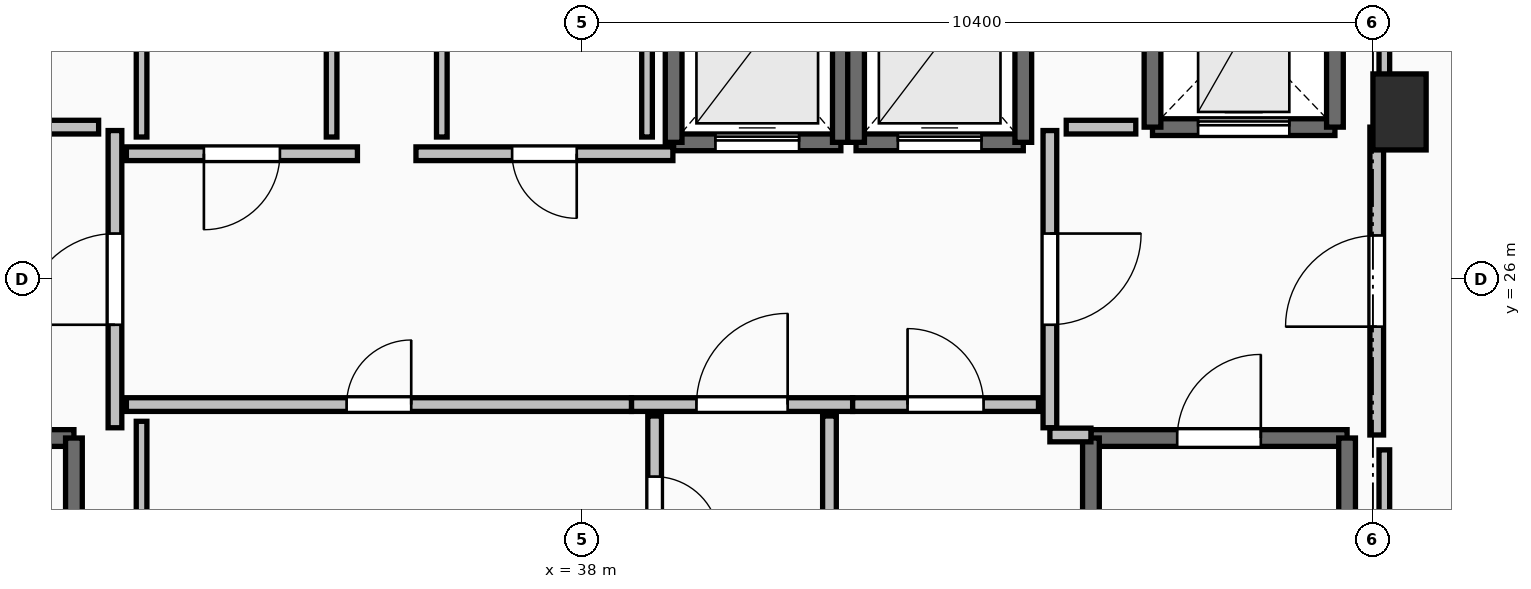
"""IFC4 building model, lengths in metres.
Left out: names, types, materials, properties, quantities, classifications, styles, units other than length and angle.
Written with IfcOpenShell. Run it as: python <this file> out.ifc"""

import sys

from ifc_helpers import new_model, si_unit, direction, frame, frame_2d, origin, origin_2d, place, context, subcontext, project, spatial, rectangle, extrude, element, fill, save


model = new_model("IFC4")
c1 = context("Model", 3, precision=1e-05, world=origin(), true_north=direction((0.0, 1.0)))
c2 = subcontext(c1, "Body", "Model", "MODEL_VIEW")
j1 = project(units=[si_unit("LENGTHUNIT", "METRE"), si_unit("PLANEANGLEUNIT", "RADIAN")], contexts=[c1])
p1 = place(None, origin())
s1 = spatial("IfcSite", under=j1, at=p1, CompositionType="ELEMENT")
p2 = place(p1, origin())
s2 = spatial("IfcBuilding", under=s1, at=p2, CompositionType="ELEMENT")
p3 = place(p2, frame((0.0, 0.0, 248.45)))
s3 = spatial("IfcBuildingStorey", under=s2, at=p3, CompositionType="ELEMENT", Elevation=248.45)
p4 = place(p3, frame((48.75, 28.2, 0.0), z_axis=(0.0, 0.0, 1.0), x_axis=(1.0, 0.0, 0.0)))
e1 = element("IfcColumn", 1, at=p4, inside=s3, PredefinedType="PILASTER", context=c2, shape_type="SweptSolid", body=[
    extrude(rectangle(XDim=0.7, YDim=1.0, at=origin_2d()), origin(), (0.0, 0.0, 1.0), 3.55),
])
p5 = place(p3, frame((27.94, 23.91, 0.0), z_axis=(0.0, 0.0, 1.0), x_axis=(1.0, 0.0, 0.0)))
e2 = element("IfcWall", 2, at=p5, inside=s3, PredefinedType="SOLIDWALL", context=c2, shape_type="SweptSolid", body=[
    extrude(rectangle(XDim=3.37, YDim=0.22, at=frame_2d((1.685, 0.0))), origin(), (0.0, 0.0, 1.0), 3.29),
])
p6 = place(p5, frame((1.135, 0.0, 0.0)))
e3 = element("IfcOpeningElement", 3, at=p6, cuts=e2, PredefinedType="OPENING", context=c2, shape_type="SweptSolid", body=[
    extrude(rectangle(XDim=1.1, YDim=2.15, at=frame_2d((0.55, 1.075))), frame((0.0, 0.125, 0.0), z_axis=(0.0, -1.0, 0.0), x_axis=(1.0, 0.0, 0.0)), (0.0, 0.0, 1.0), 0.25),
])
p7 = place(p3, frame((31.31, 23.91, 0.0), z_axis=(0.0, 0.0, 1.0), x_axis=(0.0, -1.0, 0.0)))
e4 = element("IfcWall", 4, at=p7, inside=s3, PredefinedType="SOLIDWALL", context=c2, shape_type="SweptSolid", body=[
    extrude(rectangle(XDim=7.42, YDim=0.22, at=frame_2d((3.71, 0.0))), origin(), (0.0, 0.0, 1.0), 3.29),
])
p8 = place(p3, frame((44.69, 23.91, 0.0), z_axis=(0.0, 0.0, 1.0), x_axis=(1.0, 0.0, 0.0)))
e5 = element("IfcWall", 5, at=p8, inside=s3, PredefinedType="SOLIDWALL", context=c2, shape_type="SweptSolid", body=[
    extrude(rectangle(XDim=3.37, YDim=0.22, at=frame_2d((1.685, 0.0))), origin(), (0.0, 0.0, 1.0), 3.29),
])
p9 = place(p8, frame((1.135, 0.0, 0.0)))
e6 = element("IfcOpeningElement", 6, at=p9, cuts=e5, PredefinedType="OPENING", context=c2, shape_type="SweptSolid", body=[
    extrude(rectangle(XDim=1.1, YDim=2.15, at=frame_2d((0.55, 1.075))), frame((0.0, 0.125, 0.0), z_axis=(0.0, -1.0, 0.0), x_axis=(1.0, 0.0, 0.0)), (0.0, 0.0, 1.0), 0.25),
])
for number, where, z_axis, x_axis in (
    (7, (48.06, 23.91, 0.0), (0.0, 0.0, 1.0), (0.0, -1.0, 0.0)),
    (8, (44.69, 16.49, 0.0), (0.0, 0.0, 1.0), (0.0, 1.0, 0.0)),
):
    element("IfcWall", number, at=place(p3, frame(where, z_axis=z_axis, x_axis=x_axis)), inside=s3, PredefinedType="SOLIDWALL", context=c2, shape_type="SweptSolid", body=[
        extrude(rectangle(XDim=7.42, YDim=0.22, at=frame_2d((3.71, 0.0))), origin(), (0.0, 0.0, 1.0), 3.29),
    ])
p10 = place(p3, frame((39.2, 27.8, 0.0), z_axis=(0.0, 0.0, 1.0), x_axis=(1.0, 0.0, 0.0)))
e9 = element("IfcWall", 9, at=p10, inside=s3, PredefinedType="SOLIDWALL", context=c2, shape_type="SweptSolid", body=[
    extrude(rectangle(XDim=2.2, YDim=0.22, at=frame_2d((1.1, 0.0))), origin(), (0.0, 0.0, 1.0), 3.29),
])
p11 = place(p10, frame((0.55, 0.0, 0.0)))
e10 = element("IfcOpeningElement", 10, at=p11, cuts=e9, PredefinedType="OPENING", context=c2, shape_type="SweptSolid", body=[
    extrude(rectangle(XDim=1.1, YDim=2.2, at=frame_2d((0.55, 1.1))), frame((0.0, 0.125, 0.0), z_axis=(0.0, -1.0, 0.0), x_axis=(1.0, 0.0, 0.0)), (0.0, 0.0, 1.0), 0.25),
])
for number, where, z_axis, x_axis in (
    (11, (41.4, 27.8, 0.0), (0.0, 0.0, 1.0), (0.0, 1.0, 0.0)),
    (12, (39.2, 30.4, 0.0), (0.0, 0.0, 1.0), (0.0, -1.0, 0.0)),
):
    element("IfcWall", number, at=place(p3, frame(where, z_axis=z_axis, x_axis=x_axis)), inside=s3, PredefinedType="SOLIDWALL", context=c2, shape_type="SweptSolid", body=[
        extrude(rectangle(XDim=2.6, YDim=0.22, at=frame_2d((1.3, 0.0))), origin(), (0.0, 0.0, 1.0), 3.29),
    ])
p12 = place(p3, frame((41.6, 27.8, 0.0), z_axis=(0.0, 0.0, 1.0), x_axis=(1.0, 0.0, 0.0)))
e13 = element("IfcWall", 13, at=p12, inside=s3, PredefinedType="SOLIDWALL", context=c2, shape_type="SweptSolid", body=[
    extrude(rectangle(XDim=2.2, YDim=0.22, at=frame_2d((1.1, 0.0))), origin(), (0.0, 0.0, 1.0), 3.29),
])
p13 = place(p12, frame((0.55, 0.0, 0.0)))
e14 = element("IfcOpeningElement", 14, at=p13, cuts=e13, PredefinedType="OPENING", context=c2, shape_type="SweptSolid", body=[
    extrude(rectangle(XDim=1.1, YDim=2.2, at=frame_2d((0.55, 1.1))), frame((0.0, 0.125, 0.0), z_axis=(0.0, -1.0, 0.0), x_axis=(1.0, 0.0, 0.0)), (0.0, 0.0, 1.0), 0.25),
])
for number, where, z_axis, x_axis in (
    (15, (43.8, 27.8, 0.0), (0.0, 0.0, 1.0), (0.0, 1.0, 0.0)),
    (16, (41.6, 30.4, 0.0), (0.0, 0.0, 1.0), (0.0, -1.0, 0.0)),
):
    element("IfcWall", number, at=place(p3, frame(where, z_axis=z_axis, x_axis=x_axis)), inside=s3, PredefinedType="SOLIDWALL", context=c2, shape_type="SweptSolid", body=[
        extrude(rectangle(XDim=2.6, YDim=0.22, at=frame_2d((1.3, 0.0))), origin(), (0.0, 0.0, 1.0), 3.29),
    ])
p14 = place(p3, frame((45.5, 28.0, 0.0), z_axis=(0.0, 0.0, 1.0), x_axis=(1.0, 0.0, 0.0)))
e17 = element("IfcWall", 17, at=p14, inside=s3, PredefinedType="SHEAR", context=c2, shape_type="SweptSolid", body=[
    extrude(rectangle(XDim=2.4, YDim=0.22, at=frame_2d((1.2, 0.0))), origin(), (0.0, 0.0, 1.0), 3.29),
])
p15 = place(p14, frame((0.6, 0.0, 0.0)))
e18 = element("IfcOpeningElement", 18, at=p15, cuts=e17, PredefinedType="OPENING", context=c2, shape_type="SweptSolid", body=[
    extrude(rectangle(XDim=1.2, YDim=2.2, at=frame_2d((0.6, 1.1))), frame((0.0, 0.125, 0.0), z_axis=(0.0, -1.0, 0.0), x_axis=(1.0, 0.0, 0.0)), (0.0, 0.0, 1.0), 0.25),
])
for number, where, z_axis, x_axis in (
    (19, (47.9, 28.0, 0.0), (0.0, 0.0, 1.0), (0.0, 1.0, 0.0)),
    (20, (45.5, 30.5, 0.0), (0.0, 0.0, 1.0), (0.0, -1.0, 0.0)),
):
    element("IfcWall", number, at=place(p3, frame(where, z_axis=z_axis, x_axis=x_axis)), inside=s3, PredefinedType="SHEAR", context=c2, shape_type="SweptSolid", body=[
        extrude(rectangle(XDim=2.5, YDim=0.22, at=frame_2d((1.25, 0.0))), origin(), (0.0, 0.0, 1.0), 3.29),
    ])
p16 = place(p3, frame((31.85, 24.045, 0.0), z_axis=(0.0, 0.0, 1.0), x_axis=(0.0, 1.0, 0.0)))
e21 = element("IfcWall", 21, at=p16, inside=s3, PredefinedType="PARTITIONING", context=c2, shape_type="SweptSolid", body=[
    extrude(rectangle(XDim=3.91, YDim=0.18, at=frame_2d((1.955, 0.0))), origin(), (0.0, 0.0, 1.0), 3.29),
])
p17 = place(p16, frame((1.355, 0.0, 0.0)))
e22 = element("IfcOpeningElement", 22, at=p17, cuts=e21, PredefinedType="OPENING", context=c2, shape_type="SweptSolid", body=[
    extrude(rectangle(XDim=1.2, YDim=2.15, at=frame_2d((0.6, 1.075))), frame((0.0, 0.105, 0.0), z_axis=(0.0, -1.0, 0.0), x_axis=(1.0, 0.0, 0.0)), (0.0, 0.0, 1.0), 0.21),
])
p18 = place(p3, frame((44.15, 27.955, 0.0), z_axis=(0.0, 0.0, 1.0), x_axis=(0.0, -1.0, 0.0)))
e23 = element("IfcWall", 23, at=p18, inside=s3, PredefinedType="PARTITIONING", context=c2, shape_type="SweptSolid", body=[
    extrude(rectangle(XDim=3.91, YDim=0.18, at=frame_2d((1.955, 0.0))), origin(), (0.0, 0.0, 1.0), 3.29),
])
p19 = place(p18, frame((1.355, 0.0, 0.0)))
e24 = element("IfcOpeningElement", 24, at=p19, cuts=e23, PredefinedType="OPENING", context=c2, shape_type="SweptSolid", body=[
    extrude(rectangle(XDim=1.2, YDim=2.15, at=frame_2d((0.6, 1.075))), frame((0.0, 0.105, 0.0), z_axis=(0.0, -1.0, 0.0), x_axis=(1.0, 0.0, 0.0)), (0.0, 0.0, 1.0), 0.21),
])
p20 = place(p3, frame((44.15, 23.95, 0.0), z_axis=(0.0, 0.0, 1.0), x_axis=(1.0, 0.0, 0.0)))
e25 = element("IfcWall", 25, at=p20, inside=s3, PredefinedType="PARTITIONING", context=c2, shape_type="SweptSolid", body=[
    extrude(rectangle(XDim=0.54, YDim=0.18, at=frame_2d((0.27, 0.0))), origin(), (0.0, 0.0, 1.0), 3.29),
])
p21 = place(p3, frame((48.45, 23.95, 0.0), z_axis=(0.0, 0.0, 1.0), x_axis=(0.0, 1.0, 0.0)))
e26 = element("IfcWall", 26, at=p21, inside=s3, PredefinedType="PARTITIONING", context=c2, shape_type="SweptSolid", body=[
    extrude(rectangle(XDim=4.05, YDim=0.18, at=frame_2d((2.025, 0.0))), origin(), (0.0, 0.0, 1.0), 3.29),
])
p22 = place(p21, frame((1.425, 0.0, 0.0)))
e27 = element("IfcOpeningElement", 27, at=p22, cuts=e26, PredefinedType="OPENING", context=c2, shape_type="SweptSolid", body=[
    extrude(rectangle(XDim=1.2, YDim=2.15, at=frame_2d((0.6, 1.075))), frame((0.0, 0.105, 0.0), z_axis=(0.0, -1.0, 0.0), x_axis=(1.0, 0.0, 0.0)), (0.0, 0.0, 1.0), 0.21),
])
p23 = place(p3, frame((38.645, 24.35, 0.0), z_axis=(0.0, 0.0, 1.0), x_axis=(1.0, 0.0, 0.0)))
e28 = element("IfcWall", 28, at=p23, inside=s3, PredefinedType="PARTITIONING", context=c2, shape_type="SweptSolid", body=[
    extrude(rectangle(XDim=2.91, YDim=0.18, at=frame_2d((1.455, 0.0))), origin(), (0.0, 0.0, 1.0), 3.29),
])
p24 = place(p23, frame((0.855, 0.0, 0.0)))
e29 = element("IfcOpeningElement", 29, at=p24, cuts=e28, PredefinedType="OPENING", context=c2, shape_type="SweptSolid", body=[
    extrude(rectangle(XDim=1.2, YDim=2.15, at=frame_2d((0.6, 1.075))), frame((0.0, 0.105, 0.0), z_axis=(0.0, -1.0, 0.0), x_axis=(1.0, 0.0, 0.0)), (0.0, 0.0, 1.0), 0.21),
])
p25 = place(p3, frame((41.555, 24.35, 0.0), z_axis=(0.0, 0.0, 1.0), x_axis=(1.0, 0.0, 0.0)))
e30 = element("IfcWall", 30, at=p25, inside=s3, PredefinedType="PARTITIONING", context=c2, shape_type="SweptSolid", body=[
    extrude(rectangle(XDim=2.445, YDim=0.18, at=frame_2d((1.223, 0.0))), origin(), (0.0, 0.0, 1.0), 3.29),
])
p26 = place(p25, frame((0.722, 0.0, 0.0)))
e31 = element("IfcOpeningElement", 31, at=p26, cuts=e30, PredefinedType="OPENING", context=c2, shape_type="SweptSolid", body=[
    extrude(rectangle(XDim=1.0, YDim=2.15, at=frame_2d((0.5, 1.075))), frame((0.0, 0.105, 0.0), z_axis=(0.0, -1.0, 0.0), x_axis=(1.0, 0.0, 0.0)), (0.0, 0.0, 1.0), 0.21),
])
p27 = place(p3, frame((35.04, 27.65, 0.0), z_axis=(0.0, 0.0, 1.0), x_axis=(-1.0, 0.0, 0.0)))
e32 = element("IfcWall", 32, at=p27, inside=s3, PredefinedType="PARTITIONING", context=c2, shape_type="SweptSolid", body=[
    extrude(rectangle(XDim=3.04, YDim=0.18, at=frame_2d((1.52, 0.0))), origin(), (0.0, 0.0, 1.0), 3.29),
])
p28 = place(p27, frame((1.02, 0.0, 0.0)))
e33 = element("IfcOpeningElement", 33, at=p28, cuts=e32, PredefinedType="OPENING", context=c2, shape_type="SweptSolid", body=[
    extrude(rectangle(XDim=1.0, YDim=2.15, at=frame_2d((0.5, 1.075))), frame((0.0, 0.105, 0.0), z_axis=(0.0, -1.0, 0.0), x_axis=(1.0, 0.0, 0.0)), (0.0, 0.0, 1.0), 0.21),
])
p29 = place(p3, frame((39.19, 27.65, 0.0), z_axis=(0.0, 0.0, 1.0), x_axis=(-1.0, 0.0, 0.0)))
e34 = element("IfcWall", 34, at=p29, inside=s3, PredefinedType="PARTITIONING", context=c2, shape_type="SweptSolid", body=[
    extrude(rectangle(XDim=3.38, YDim=0.18, at=frame_2d((1.69, 0.0))), origin(), (0.0, 0.0, 1.0), 3.29),
])
p30 = place(p29, frame((1.265, 0.0, 0.0)))
e35 = element("IfcOpeningElement", 35, at=p30, cuts=e34, PredefinedType="OPENING", context=c2, shape_type="SweptSolid", body=[
    extrude(rectangle(XDim=0.85, YDim=2.1, at=frame_2d((0.425, 1.05))), frame((0.0, 0.105, 0.0), z_axis=(0.0, -1.0, 0.0), x_axis=(1.0, 0.0, 0.0)), (0.0, 0.0, 1.0), 0.21),
])
p31 = place(p3, frame((32.0, 24.35, 0.0), z_axis=(0.0, 0.0, 1.0), x_axis=(1.0, 0.0, 0.0)))
e36 = element("IfcWall", 36, at=p31, inside=s3, PredefinedType="PARTITIONING", context=c2, shape_type="SweptSolid", body=[
    extrude(rectangle(XDim=6.645, YDim=0.18, at=frame_2d((3.323, 0.0))), origin(), (0.0, 0.0, 1.0), 3.29),
])
p32 = place(p31, frame((2.897, 0.0, 0.0)))
e37 = element("IfcOpeningElement", 37, at=p32, cuts=e36, PredefinedType="OPENING", context=c2, shape_type="SweptSolid", body=[
    extrude(rectangle(XDim=0.85, YDim=2.1, at=frame_2d((0.425, 1.05))), frame((0.0, 0.105, 0.0), z_axis=(0.0, -1.0, 0.0), x_axis=(1.0, 0.0, 0.0)), (0.0, 0.0, 1.0), 0.21),
])
p33 = place(p3, frame((41.25, 20.305, 0.0), z_axis=(0.0, 0.0, 1.0), x_axis=(0.0, 1.0, 0.0)))
e38 = element("IfcWall", 38, at=p33, inside=s3, PredefinedType="PARTITIONING", context=c2, shape_type="SweptSolid", body=[
    extrude(rectangle(XDim=3.895, YDim=0.18, at=frame_2d((1.948, 0.0))), origin(), (0.0, 0.0, 1.0), 2.482),
])
p34 = place(p33, frame((1.448, 0.0, 0.0)))
e39 = element("IfcOpeningElement", 39, at=p34, cuts=e38, PredefinedType="OPENING", context=c2, shape_type="SweptSolid", body=[
    extrude(rectangle(XDim=1.0, YDim=2.15, at=frame_2d((0.5, 1.075))), frame((0.0, 0.105, 0.0), z_axis=(0.0, -1.0, 0.0), x_axis=(1.0, 0.0, 0.0)), (0.0, 0.0, 1.0), 0.21),
])
p35 = place(p3, frame((38.95, 24.2, 0.0), z_axis=(0.0, 0.0, 1.0), x_axis=(0.0, -1.0, 0.0)))
e40 = element("IfcWall", 40, at=p35, inside=s3, PredefinedType="PARTITIONING", context=c2, shape_type="SweptSolid", body=[
    extrude(rectangle(XDim=2.445, YDim=0.18, at=frame_2d((1.223, 0.0))), origin(), (0.0, 0.0, 1.0), 2.482),
])
p36 = place(p35, frame((0.798, 0.0, 0.0)))
e41 = element("IfcOpeningElement", 41, at=p36, cuts=e40, PredefinedType="OPENING", context=c2, shape_type="SweptSolid", body=[
    extrude(rectangle(XDim=0.85, YDim=2.1, at=frame_2d((0.425, 1.05))), frame((0.0, 0.105, 0.0), z_axis=(0.0, -1.0, 0.0), x_axis=(1.0, 0.0, 0.0)), (0.0, 0.0, 1.0), 0.21),
])
for number, where, z_axis, x_axis in (
    (42, (31.635, 28.0, 0.0), (0.0, 0.0, 1.0), (-1.0, 0.0, 0.0)),
    (43, (45.28, 28.0, 0.0), (0.0, 0.0, 1.0), (-1.0, 0.0, 0.0)),
):
    element("IfcWall", number, at=place(p3, frame(where, z_axis=z_axis, x_axis=x_axis)), inside=s3, PredefinedType="PARTITIONING", context=c2, shape_type="SweptSolid", body=[
        extrude(rectangle(XDim=0.915, YDim=0.18, at=frame_2d((0.458, 0.0))), origin(), (0.0, 0.0, 1.0), 3.29),
    ])
for number, where, z_axis, x_axis in (
    (44, (32.2, 30.26, 0.0), (0.0, 0.0, 1.0), (0.0, -1.0, 0.0)),
    (45, (34.7, 27.87, 0.0), (0.0, 0.0, 1.0), (0.0, 1.0, 0.0)),
    (46, (36.15, 30.26, 0.0), (0.0, 0.0, 1.0), (0.0, -1.0, 0.0)),
    (47, (38.85, 27.87, 0.0), (0.0, 0.0, 1.0), (0.0, 1.0, 0.0)),
):
    element("IfcWall", number, at=place(p3, frame(where, z_axis=z_axis, x_axis=x_axis)), inside=s3, PredefinedType="PARTITIONING", context=c2, shape_type="SweptSolid", body=[
        extrude(rectangle(XDim=2.39, YDim=0.14, at=frame_2d((1.195, 0.0))), origin(), (0.0, 0.0, 1.0), 3.29),
    ])
p37 = place(p3, frame((32.2, 24.13, 0.0), z_axis=(0.0, 0.0, 1.0), x_axis=(0.0, -1.0, 0.0)))
e48 = element("IfcWall", 48, at=p37, inside=s3, PredefinedType="PARTITIONING", context=c2, shape_type="SweptSolid", body=[
    extrude(rectangle(XDim=2.46, YDim=0.14, at=frame_2d((1.23, 0.0))), origin(), (0.0, 0.0, 1.0), 2.482),
])
p38 = place(p3, frame((48.55, 16.24, 0.0), z_axis=(0.0, 0.0, 1.0), x_axis=(0.0, 1.0, 0.0)))
e49 = element("IfcWall", 49, at=p38, inside=s3, PredefinedType="PARTITIONING", context=c2, shape_type="SweptSolid", body=[
    extrude(rectangle(XDim=7.514, YDim=0.14, at=frame_2d((3.757, 0.0))), origin(), (0.0, 0.0, 1.0), 2.482),
])
p39 = place(p3, frame((48.55, 28.196, 0.0), z_axis=(0.0, 0.0, 1.0), x_axis=(0.0, 1.0, 0.0)))
e50 = element("IfcWall", 50, at=p39, inside=s3, PredefinedType="PARTITIONING", context=c2, shape_type="SweptSolid", body=[
    extrude(rectangle(XDim=5.254, YDim=0.14, at=frame_2d((2.627, 0.0))), origin(), (0.0, 0.0, 1.0), 2.482),
])
p40 = place(p9, origin())
e51 = element("IfcDoor", 51, at=p40, inside=s3, OperationType="SINGLE_SWING_RIGHT", PredefinedType="DOOR", context=c2, shape_type="SweptSolid", body=[
    extrude(rectangle(XDim=1.1, YDim=2.15, at=frame_2d((0.55, 1.075))), frame((0.0, 0.025, 0.0), z_axis=(0.0, -1.0, 0.0), x_axis=(1.0, 0.0, 0.0)), (0.0, 0.0, 1.0), 0.05),
])
fill(e6, e51)
p41 = place(p11, origin())
e52 = element("IfcDoor", 52, at=p41, inside=s3, OperationType="SLIDING_TO_LEFT", PredefinedType="DOOR", context=c2, shape_type="SweptSolid", body=[
    extrude(rectangle(XDim=1.1, YDim=2.2, at=frame_2d((0.55, 1.1))), frame((0.0, 0.025, 0.0), z_axis=(0.0, -1.0, 0.0), x_axis=(1.0, 0.0, 0.0)), (0.0, 0.0, 1.0), 0.05),
])
fill(e10, e52)
p42 = place(p13, origin())
e53 = element("IfcDoor", 53, at=p42, inside=s3, OperationType="SLIDING_TO_LEFT", PredefinedType="DOOR", context=c2, shape_type="SweptSolid", body=[
    extrude(rectangle(XDim=1.1, YDim=2.2, at=frame_2d((0.55, 1.1))), frame((0.0, 0.025, 0.0), z_axis=(0.0, -1.0, 0.0), x_axis=(1.0, 0.0, 0.0)), (0.0, 0.0, 1.0), 0.05),
])
fill(e14, e53)
p43 = place(p15, origin())
e54 = element("IfcDoor", 54, at=p43, inside=s3, OperationType="SLIDING_TO_LEFT", PredefinedType="DOOR", context=c2, shape_type="SweptSolid", body=[
    extrude(rectangle(XDim=1.2, YDim=2.2, at=frame_2d((0.6, 1.1))), frame((0.0, 0.025, 0.0), z_axis=(0.0, -1.0, 0.0), x_axis=(1.0, 0.0, 0.0)), (0.0, 0.0, 1.0), 0.05),
])
fill(e18, e54)
p44 = place(p17, origin())
e55 = element("IfcDoor", 55, at=p44, inside=s3, OperationType="SINGLE_SWING_LEFT", PredefinedType="DOOR", context=c2, shape_type="SweptSolid", body=[
    extrude(rectangle(XDim=1.2, YDim=2.15, at=frame_2d((0.6, 1.075))), frame((0.0, 0.025, 0.0), z_axis=(0.0, -1.0, 0.0), x_axis=(1.0, 0.0, 0.0)), (0.0, 0.0, 1.0), 0.05),
])
fill(e22, e55)
p45 = place(p19, origin())
e56 = element("IfcDoor", 56, at=p45, inside=s3, OperationType="SINGLE_SWING_LEFT", PredefinedType="DOOR", context=c2, shape_type="SweptSolid", body=[
    extrude(rectangle(XDim=1.2, YDim=2.15, at=frame_2d((0.6, 1.075))), frame((0.0, 0.025, 0.0), z_axis=(0.0, -1.0, 0.0), x_axis=(1.0, 0.0, 0.0)), (0.0, 0.0, 1.0), 0.05),
])
fill(e24, e56)
p46 = place(p22, origin())
e57 = element("IfcDoor", 57, at=p46, inside=s3, OperationType="SINGLE_SWING_LEFT", PredefinedType="DOOR", context=c2, shape_type="SweptSolid", body=[
    extrude(rectangle(XDim=1.2, YDim=2.15, at=frame_2d((0.6, 1.075))), frame((0.0, 0.025, 0.0), z_axis=(0.0, -1.0, 0.0), x_axis=(1.0, 0.0, 0.0)), (0.0, 0.0, 1.0), 0.05),
])
fill(e27, e57)
p47 = place(p24, origin())
e58 = element("IfcDoor", 58, at=p47, inside=s3, OperationType="SINGLE_SWING_RIGHT", PredefinedType="DOOR", context=c2, shape_type="SweptSolid", body=[
    extrude(rectangle(XDim=1.2, YDim=2.15, at=frame_2d((0.6, 1.075))), frame((0.0, 0.025, 0.0), z_axis=(0.0, -1.0, 0.0), x_axis=(1.0, 0.0, 0.0)), (0.0, 0.0, 1.0), 0.05),
])
fill(e29, e58)
p48 = place(p26, origin())
e59 = element("IfcDoor", 59, at=p48, inside=s3, OperationType="SINGLE_SWING_LEFT", PredefinedType="DOOR", context=c2, shape_type="SweptSolid", body=[
    extrude(rectangle(XDim=1.0, YDim=2.15, at=frame_2d((0.5, 1.075))), frame((0.0, 0.025, 0.0), z_axis=(0.0, -1.0, 0.0), x_axis=(1.0, 0.0, 0.0)), (0.0, 0.0, 1.0), 0.05),
])
fill(e31, e59)
p49 = place(p28, origin())
e60 = element("IfcDoor", 60, at=p49, inside=s3, OperationType="SINGLE_SWING_RIGHT", PredefinedType="DOOR", context=c2, shape_type="SweptSolid", body=[
    extrude(rectangle(XDim=1.0, YDim=2.15, at=frame_2d((0.5, 1.075))), frame((0.0, 0.025, 0.0), z_axis=(0.0, -1.0, 0.0), x_axis=(1.0, 0.0, 0.0)), (0.0, 0.0, 1.0), 0.05),
])
fill(e33, e60)
p50 = place(p30, origin())
e61 = element("IfcDoor", 61, at=p50, inside=s3, OperationType="SINGLE_SWING_LEFT", PredefinedType="DOOR", context=c2, shape_type="SweptSolid", body=[
    extrude(rectangle(XDim=0.85, YDim=2.1, at=frame_2d((0.425, 1.05))), frame((0.0, 0.025, 0.0), z_axis=(0.0, -1.0, 0.0), x_axis=(1.0, 0.0, 0.0)), (0.0, 0.0, 1.0), 0.05),
])
fill(e35, e61)
p51 = place(p32, origin())
e62 = element("IfcDoor", 62, at=p51, inside=s3, OperationType="SINGLE_SWING_RIGHT", PredefinedType="DOOR", context=c2, shape_type="SweptSolid", body=[
    extrude(rectangle(XDim=0.85, YDim=2.1, at=frame_2d((0.425, 1.05))), frame((0.0, 0.025, 0.0), z_axis=(0.0, -1.0, 0.0), x_axis=(1.0, 0.0, 0.0)), (0.0, 0.0, 1.0), 0.05),
])
fill(e37, e62)
p52 = place(p36, origin())
e63 = element("IfcDoor", 63, at=p52, inside=s3, OperationType="SINGLE_SWING_RIGHT", PredefinedType="DOOR", context=c2, shape_type="SweptSolid", body=[
    extrude(rectangle(XDim=0.85, YDim=2.1, at=frame_2d((0.425, 1.05))), frame((0.0, 0.025, 0.0), z_axis=(0.0, -1.0, 0.0), x_axis=(1.0, 0.0, 0.0)), (0.0, 0.0, 1.0), 0.05),
])
fill(e41, e63)
save(model, sys.argv[1])
